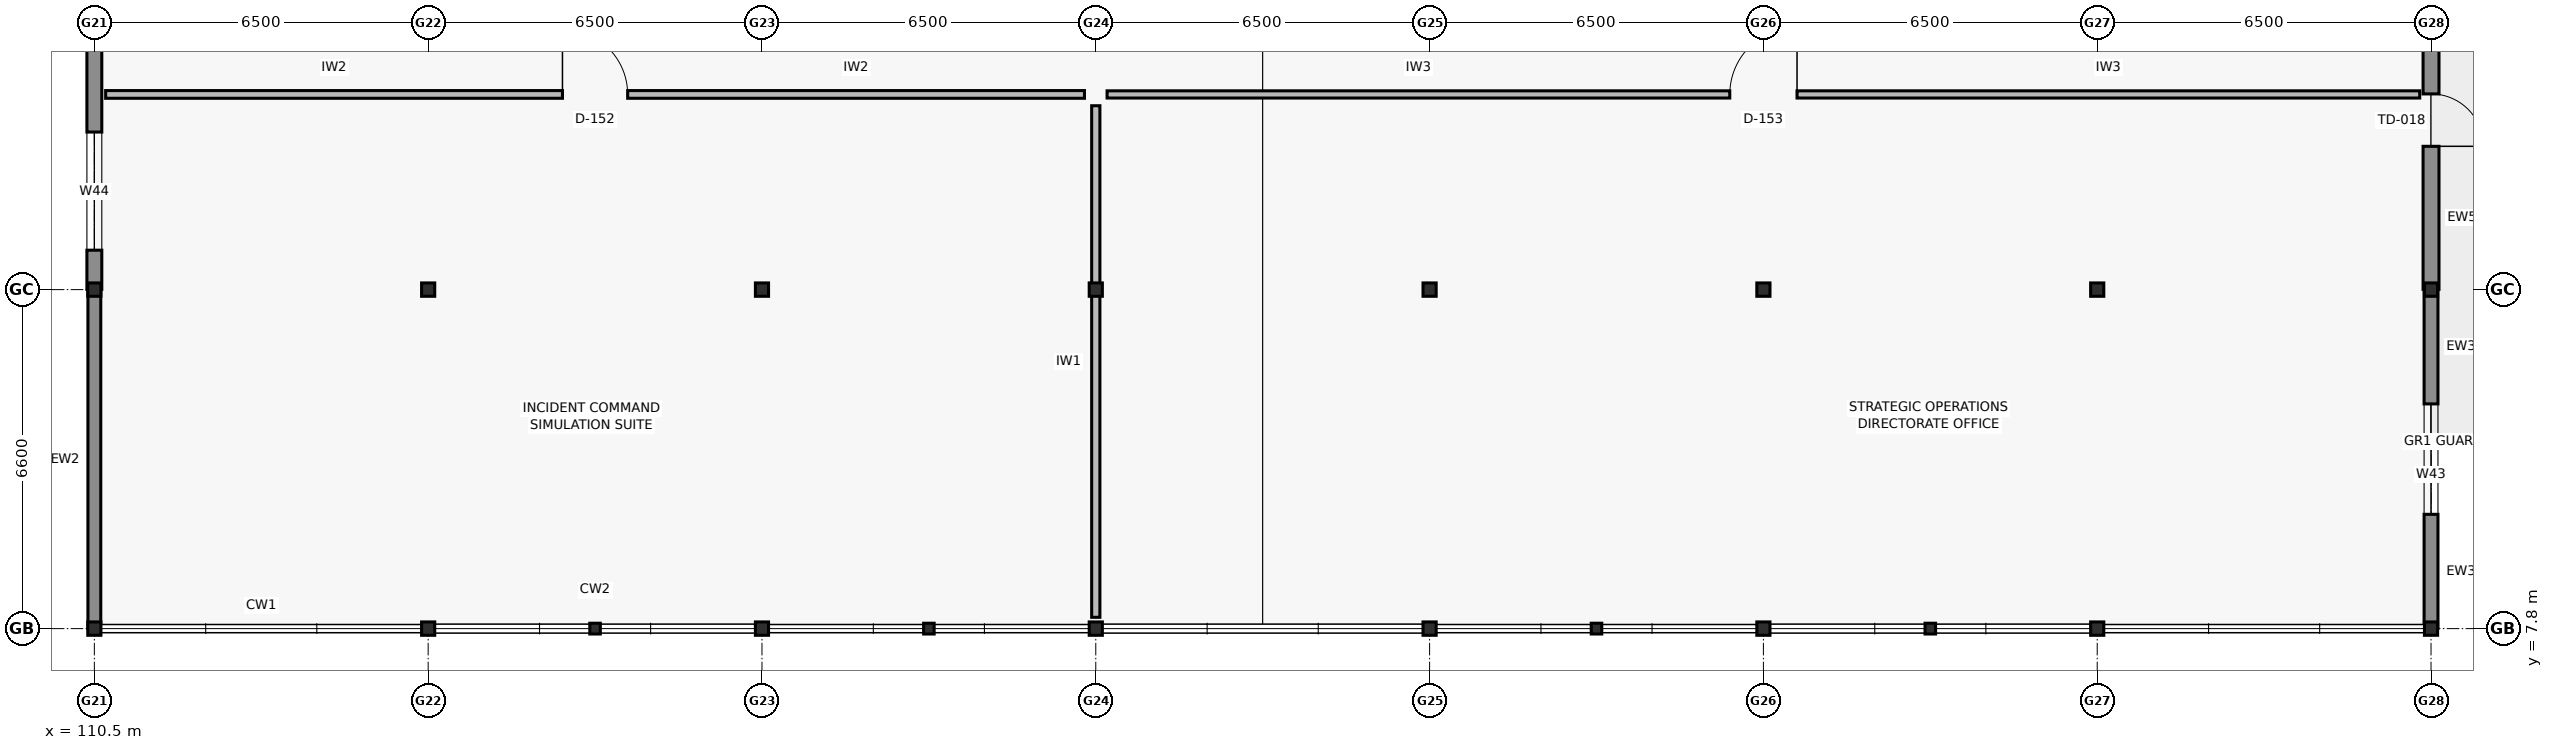
"""IFC4 building model, lengths in metres.
Left out: names, types, materials, properties, quantities, classifications, styles, units other than length and angle.
Written with IfcOpenShell. Run it as: python <this file> out.ifc"""

import sys

from ifc_helpers import new_model, si_unit, direction, frame, frame_2d, origin, origin_2d, place, context, subcontext, project, spatial, rectangle, i_section, extrude, element, fill, save


model = new_model("IFC4")
c1 = context("Model", 3, precision=1e-05, world=origin(), true_north=direction((0.0, 1.0)))
c2 = subcontext(c1, "Body", "Model", "MODEL_VIEW")
j1 = project(units=[si_unit("LENGTHUNIT", "METRE"), si_unit("PLANEANGLEUNIT", "RADIAN")], contexts=[c1])
p1 = place(None, origin())
s1 = spatial("IfcSite", under=j1, at=p1, CompositionType="ELEMENT")
p2 = place(p1, origin())
s2 = spatial("IfcBuilding", under=s1, at=p2, CompositionType="ELEMENT")
p3 = place(p2, frame((0.0, 0.0, 17.4)))
s3 = spatial("IfcBuildingStorey", under=s2, at=p3, CompositionType="ELEMENT", Elevation=17.4)
for number, where, z_axis, x_axis in (
    (1, (110.5, 7.8, 0.0), (0.0, 0.0, 1.0), (1.0, 0.0, 0.0)),
    (2, (110.5, 14.4, 0.0), (0.0, 0.0, 1.0), (1.0, 0.0, 0.0)),
    (3, (117.0, 7.8, 0.0), (0.0, 0.0, 1.0), (1.0, 0.0, 0.0)),
    (4, (117.0, 14.4, 0.0), (0.0, 0.0, 1.0), (1.0, 0.0, 0.0)),
    (5, (123.5, 7.8, 0.0), (0.0, 0.0, 1.0), (1.0, 0.0, 0.0)),
    (6, (123.5, 14.4, 0.0), (0.0, 0.0, 1.0), (1.0, 0.0, 0.0)),
    (7, (130.0, 7.8, 0.0), (0.0, 0.0, 1.0), (1.0, 0.0, 0.0)),
    (8, (130.0, 14.4, 0.0), (0.0, 0.0, 1.0), (1.0, 0.0, 0.0)),
    (9, (136.5, 7.8, 0.0), (0.0, 0.0, 1.0), (1.0, 0.0, 0.0)),
    (10, (136.5, 14.4, 0.0), (0.0, 0.0, 1.0), (1.0, 0.0, 0.0)),
    (11, (143.0, 7.8, 0.0), (0.0, 0.0, 1.0), (1.0, 0.0, 0.0)),
    (12, (143.0, 14.4, 0.0), (0.0, 0.0, 1.0), (1.0, 0.0, 0.0)),
    (13, (149.5, 7.8, 0.0), (0.0, 0.0, 1.0), (1.0, 0.0, 0.0)),
    (14, (149.5, 14.4, 0.0), (0.0, 0.0, 1.0), (1.0, 0.0, 0.0)),
    (15, (156.0, 7.8, 0.0), (0.0, 0.0, 1.0), (1.0, 0.0, 0.0)),
    (16, (156.0, 14.4, 0.0), (0.0, 0.0, 1.0), (1.0, 0.0, 0.0)),
):
    element("IfcColumn", number, at=place(p3, frame(where, z_axis=z_axis, x_axis=x_axis)), inside=s3, PredefinedType="COLUMN", context=c2, shape_type="SweptSolid", body=[
        extrude(i_section(OverallWidth=0.256, OverallDepth=0.26, WebThickness=0.01, FlangeThickness=0.017, FilletRadius=0.013, at=origin_2d()), origin(), (0.0, 0.0, 1.0), 3.9),
    ])
for number, where, z_axis, x_axis in (
    (17, (120.25, 7.8, 0.0), (0.0, 0.0, 1.0), (1.0, 0.0, 0.0)),
    (18, (126.75, 7.8, 0.0), (0.0, 0.0, 1.0), (1.0, 0.0, 0.0)),
    (19, (139.75, 7.8, 0.0), (0.0, 0.0, 1.0), (1.0, 0.0, 0.0)),
    (20, (146.25, 7.8, 0.0), (0.0, 0.0, 1.0), (1.0, 0.0, 0.0)),
):
    element("IfcColumn", number, at=place(p3, frame(where, z_axis=z_axis, x_axis=x_axis)), inside=s3, PredefinedType="PILASTER", context=c2, shape_type="SweptSolid", body=[
        extrude(i_section(OverallWidth=0.205, OverallDepth=0.21, WebThickness=0.009, FlangeThickness=0.014, FilletRadius=0.011, at=origin_2d()), origin(), (0.0, 0.0, 1.0), 3.9),
    ])
p4 = place(p3, frame((110.5, 7.805, 0.0), z_axis=(0.0, 0.0, 1.0), x_axis=(0.0, 1.0, 0.0)))
e21 = element("IfcWall", 21, at=p4, inside=s3, PredefinedType="SOLIDWALL", context=c2, shape_type="SweptSolid", body=[
    extrude(rectangle(XDim=6.59, YDim=0.25, at=frame_2d((3.295, 0.0))), origin(), (0.0, 0.0, 1.0), 3.02),
])
p5 = place(p3, frame((156.0, 14.395, 0.0), z_axis=(0.0, 0.0, 1.0), x_axis=(0.0, -1.0, 0.0)))
e22 = element("IfcWall", 22, at=p5, inside=s3, PredefinedType="SOLIDWALL", context=c2, shape_type="SweptSolid", body=[
    extrude(rectangle(XDim=6.59, YDim=0.27, at=frame_2d((3.295, 0.0))), origin(), (0.0, 0.0, 1.0), 3.02),
])
p6 = place(p5, frame((2.22, 0.0, 0.8)))
e23 = element("IfcOpeningElement", 23, at=p6, cuts=e22, PredefinedType="OPENING", context=c2, shape_type="SweptSolid", body=[
    extrude(rectangle(XDim=2.15, YDim=1.55, at=frame_2d((1.075, 0.775))), frame((0.0, 0.145, 0.0), z_axis=(0.0, -1.0, 0.0), x_axis=(1.0, 0.0, 0.0)), (0.0, 0.0, 1.0), 0.29),
])
p7 = place(p3, frame((110.5, 14.405, 0.0), z_axis=(0.0, 0.0, 1.0), x_axis=(0.0, 1.0, 0.0)))
e24 = element("IfcWall", 24, at=p7, inside=s3, PredefinedType="SOLIDWALL", context=c2, shape_type="SweptSolid", body=[
    extrude(rectangle(XDim=6.59, YDim=0.29, at=frame_2d((3.295, 0.0))), origin(), (0.0, 0.0, 1.0), 3.02),
])
p8 = place(p7, frame((0.762, 0.0, 0.8)))
e25 = element("IfcOpeningElement", 25, at=p8, cuts=e24, PredefinedType="OPENING", context=c2, shape_type="SweptSolid", body=[
    extrude(rectangle(XDim=2.3, YDim=1.55, at=frame_2d((1.15, 0.775))), frame((0.0, 0.155, 0.0), z_axis=(0.0, -1.0, 0.0), x_axis=(1.0, 0.0, 0.0)), (0.0, 0.0, 1.0), 0.31),
])
p9 = place(p3, frame((156.0, 20.995, 0.0), z_axis=(0.0, 0.0, 1.0), x_axis=(0.0, -1.0, 0.0)))
e26 = element("IfcWall", 26, at=p9, inside=s3, PredefinedType="SOLIDWALL", context=c2, shape_type="SweptSolid", body=[
    extrude(rectangle(XDim=6.59, YDim=0.31, at=frame_2d((3.295, 0.0))), origin(), (0.0, 0.0, 1.0), 3.02),
])
p10 = place(p9, frame((2.785, 0.0, 0.0)))
e27 = element("IfcOpeningElement", 27, at=p10, cuts=e26, PredefinedType="OPENING", context=c2, shape_type="SweptSolid", body=[
    extrude(rectangle(XDim=1.02, YDim=2.14, at=frame_2d((0.51, 1.07))), frame((0.0, 0.165, 0.0), z_axis=(0.0, -1.0, 0.0), x_axis=(1.0, 0.0, 0.0)), (0.0, 0.0, 1.0), 0.33),
])
p11 = place(p3, frame((130.0, 8.02, 0.0), z_axis=(0.0, 0.0, 1.0), x_axis=(0.0, 1.0, 0.0)))
e28 = element("IfcWall", 28, at=p11, inside=s3, PredefinedType="PARTITIONING", context=c2, shape_type="SweptSolid", body=[
    extrude(rectangle(XDim=9.96, YDim=0.16, at=frame_2d((4.98, 0.0))), origin(), (0.0, 0.0, 1.0), 3.0),
])
p12 = place(p3, frame((110.72, 18.2, 0.0), z_axis=(0.0, 0.0, 1.0), x_axis=(1.0, 0.0, 0.0)))
e29 = element("IfcWall", 29, at=p12, inside=s3, PredefinedType="PARTITIONING", context=c2, shape_type="SweptSolid", body=[
    extrude(rectangle(XDim=19.06, YDim=0.15, at=frame_2d((9.53, 0.0))), origin(), (0.0, 0.0, 1.0), 3.0),
])
p13 = place(p12, frame((8.895, 0.0, 0.0)))
e30 = element("IfcOpeningElement", 30, at=p13, cuts=e29, PredefinedType="OPENING", context=c2, shape_type="SweptSolid", body=[
    extrude(rectangle(XDim=1.27, YDim=2.1, at=frame_2d((0.635, 1.05))), frame((0.0, 0.085, 0.0), z_axis=(0.0, -1.0, 0.0), x_axis=(1.0, 0.0, 0.0)), (0.0, 0.0, 1.0), 0.17),
])
p14 = place(p3, frame((130.22, 18.2, 0.0), z_axis=(0.0, 0.0, 1.0), x_axis=(1.0, 0.0, 0.0)))
e31 = element("IfcWall", 31, at=p14, inside=s3, PredefinedType="PARTITIONING", context=c2, shape_type="SweptSolid", body=[
    extrude(rectangle(XDim=25.56, YDim=0.14, at=frame_2d((12.78, 0.0))), origin(), (0.0, 0.0, 1.0), 3.0),
])
p15 = place(p14, frame((12.125, 0.0, 0.0)))
e32 = element("IfcOpeningElement", 32, at=p15, cuts=e31, PredefinedType="OPENING", context=c2, shape_type="SweptSolid", body=[
    extrude(rectangle(XDim=1.31, YDim=2.14, at=frame_2d((0.655, 1.07))), frame((0.0, 0.08, 0.0), z_axis=(0.0, -1.0, 0.0), x_axis=(1.0, 0.0, 0.0)), (0.0, 0.0, 1.0), 0.16),
])
p16 = place(p6, origin())
e33 = element("IfcWindow", 33, at=p16, inside=s3, PartitioningType="DOUBLE_PANEL_VERTICAL", PredefinedType="WINDOW", context=c2, shape_type="SweptSolid", body=[
    extrude(rectangle(XDim=2.15, YDim=1.55, at=frame_2d((1.075, 0.775))), frame((0.0, 0.03, 0.0), z_axis=(0.0, -1.0, 0.0), x_axis=(1.0, 0.0, 0.0)), (0.0, 0.0, 1.0), 0.06),
])
fill(e23, e33)
p17 = place(p8, origin())
e34 = element("IfcWindow", 34, at=p17, inside=s3, PartitioningType="DOUBLE_PANEL_VERTICAL", PredefinedType="WINDOW", context=c2, shape_type="SweptSolid", body=[
    extrude(rectangle(XDim=2.3, YDim=1.55, at=frame_2d((1.15, 0.775))), frame((0.0, 0.03, 0.0), z_axis=(0.0, -1.0, 0.0), x_axis=(1.0, 0.0, 0.0)), (0.0, 0.0, 1.0), 0.06),
])
fill(e25, e34)
p18 = place(p10, origin())
e35 = element("IfcDoor", 35, at=p18, inside=s3, OperationType="SINGLE_SWING_RIGHT", PredefinedType="DOOR", context=c2, shape_type="SweptSolid", body=[
    extrude(rectangle(XDim=1.02, YDim=2.14, at=frame_2d((0.51, 1.07))), frame((0.0, 0.025, 0.0), z_axis=(0.0, -1.0, 0.0), x_axis=(1.0, 0.0, 0.0)), (0.0, 0.0, 1.0), 0.05),
])
fill(e27, e35)
p19 = place(p13, origin())
e36 = element("IfcDoor", 36, at=p19, inside=s3, OperationType="SINGLE_SWING_LEFT", PredefinedType="DOOR", context=c2, shape_type="SweptSolid", body=[
    extrude(rectangle(XDim=1.27, YDim=2.1, at=frame_2d((0.635, 1.05))), frame((0.0, 0.025, 0.0), z_axis=(0.0, -1.0, 0.0), x_axis=(1.0, 0.0, 0.0)), (0.0, 0.0, 1.0), 0.05),
])
fill(e30, e36)
p20 = place(p15, origin())
e37 = element("IfcDoor", 37, at=p20, inside=s3, OperationType="SINGLE_SWING_RIGHT", PredefinedType="DOOR", context=c2, shape_type="SweptSolid", body=[
    extrude(rectangle(XDim=1.31, YDim=2.14, at=frame_2d((0.655, 1.07))), frame((0.0, 0.025, 0.0), z_axis=(0.0, -1.0, 0.0), x_axis=(1.0, 0.0, 0.0)), (0.0, 0.0, 1.0), 0.05),
])
fill(e32, e37)
save(model, sys.argv[1])
